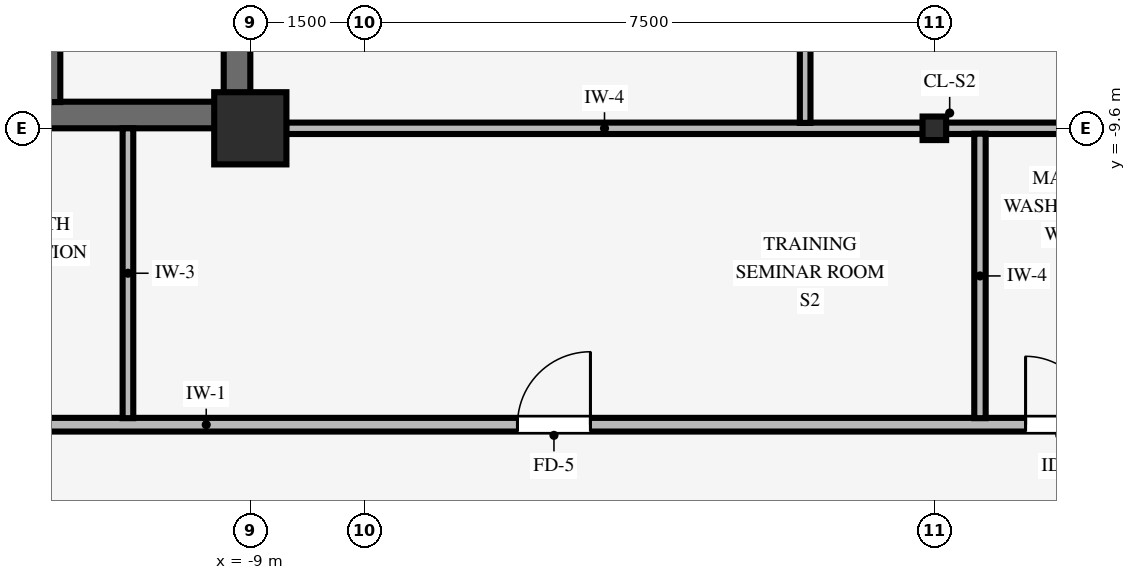
"""IFC4 building model, lengths in metres.
Left out: names, types, materials, properties, quantities, classifications, styles, units other than length and angle.
Written with IfcOpenShell. Run it as: python <this file> out.ifc"""

import sys

from ifc_helpers import new_model, si_unit, direction, frame, frame_2d, origin, origin_2d, place, context, subcontext, project, spatial, rectangle, i_section, extrude, source, transform, mapped, element, fill, save


model = new_model("IFC4")
c1 = context("Model", 3, precision=1e-05, world=origin(), true_north=direction((0.0, 1.0)))
c2 = subcontext(c1, "Body", "Model", "MODEL_VIEW")
j1 = project(units=[si_unit("LENGTHUNIT", "METRE"), si_unit("PLANEANGLEUNIT", "RADIAN")], contexts=[c1])
p1 = place(None, origin())
s1 = spatial("IfcSite", under=j1, at=p1, CompositionType="ELEMENT")
p2 = place(p1, origin())
s2 = spatial("IfcBuilding", under=s1, at=p2, CompositionType="ELEMENT")
p3 = place(p2, frame((0.0, 0.0, 212.8)))
s3 = spatial("IfcBuildingStorey", under=s2, at=p3, CompositionType="ELEMENT", Elevation=212.8)
p4 = place(p3, frame((-17.5, -9.425, 0.0), z_axis=(0.0, 0.0, 1.0), x_axis=(1.0, 0.0, 0.0)))
e1 = element("IfcWall", 1, at=p4, inside=s3, PredefinedType="SHEAR", context=c2, shape_type="SweptSolid", body=[
    extrude(rectangle(XDim=8.5, YDim=0.35, at=frame_2d((4.25, 0.0))), origin(), (0.0, 0.0, 1.0), 3.37),
])
p5 = place(p3, frame((-9.175, -9.255, 0.0), z_axis=(0.0, 0.0, 1.0), x_axis=(0.0, 1.0, 0.0)))
e2 = element("IfcWall", 2, at=p5, inside=s3, PredefinedType="SHEAR", context=c2, shape_type="SweptSolid", body=[
    extrude(rectangle(XDim=18.51, YDim=0.35, at=frame_2d((9.255, 0.0))), origin(), (0.0, 0.0, 1.0), 3.37),
])
p6 = place(p5, frame((8.655, 0.0, 0.0)))
e3 = element("IfcOpeningElement", 3, at=p6, cuts=e2, PredefinedType="OPENING", context=c2, shape_type="SweptSolid", body=[
    extrude(rectangle(XDim=1.2, YDim=2.15, at=frame_2d((0.6, 1.075))), frame((0.0, 0.185, 0.0), z_axis=(0.0, -1.0, 0.0), x_axis=(1.0, 0.0, 0.0)), (0.0, 0.0, 1.0), 0.37),
])
p7 = place(p3, frame((-9.0, -9.6, 0.0), z_axis=(0.0, 0.0, 1.0), x_axis=(1.0, 0.0, 0.0)))
e4 = element("IfcColumn", 4, at=p7, inside=s3, PredefinedType="COLUMN", context=c2, shape_type="SweptSolid", body=[
    extrude(rectangle(XDim=0.95, YDim=0.95, at=origin_2d()), origin(), (0.0, 0.0, 1.0), 3.37),
])
p8 = place(p3, frame((0.0, -9.6, 0.0), z_axis=(0.0, 0.0, 1.0), x_axis=(1.0, 0.0, 0.0)))
e5 = element("IfcColumn", 5, at=p8, inside=s3, PredefinedType="COLUMN", context=c2, shape_type="SweptSolid", body=[
    extrude(i_section(OverallWidth=0.31, OverallDepth=0.31, WebThickness=0.015, FlangeThickness=0.015, FilletRadius=0.015, at=origin_2d()), origin(), (0.0, 0.0, 1.0), 3.37),
])
p9 = place(p3, frame((-11.6, -9.255, 0.0), z_axis=(0.0, 0.0, 1.0), x_axis=(0.0, 1.0, 0.0)))
e6 = element("IfcWall", 6, at=p9, inside=s3, PredefinedType="SHEAR", context=c2, shape_type="SweptSolid", body=[
    extrude(rectangle(XDim=8.025, YDim=0.2, at=frame_2d((4.012, 0.0))), origin(), (0.0, 0.0, 1.0), 3.37),
])
p10 = place(p9, frame((5.615, 0.0, 0.0)))
e7 = element("IfcOpeningElement", 7, at=p10, cuts=e6, PredefinedType="OPENING", context=c2, shape_type="SweptSolid", body=[
    extrude(rectangle(XDim=0.88, YDim=2.1, at=frame_2d((0.44, 1.05))), frame((0.0, 0.11, 0.0), z_axis=(0.0, -1.0, 0.0), x_axis=(1.0, 0.0, 0.0)), (0.0, 0.0, 1.0), 0.22),
])
p11 = place(p3, frame((-17.7, -13.5, 0.0), z_axis=(0.0, 0.0, 1.0), x_axis=(1.0, 0.0, 0.0)))
e8 = element("IfcWall", 8, at=p11, inside=s3, PredefinedType="PARTITIONING", context=c2, shape_type="SweptSolid", body=[
    extrude(rectangle(XDim=24.3, YDim=0.18, at=frame_2d((12.15, 0.0))), origin(), (0.0, 0.0, 1.0), 3.008),
])
p12 = place(p11, frame((12.215, 0.0, 0.0)))
e9 = element("IfcOpeningElement", 9, at=p12, cuts=e8, PredefinedType="OPENING", context=c2, shape_type="SweptSolid", body=[
    extrude(rectangle(XDim=0.96, YDim=2.1, at=frame_2d((0.48, 1.05))), frame((0.0, 0.1, 0.0), z_axis=(0.0, -1.0, 0.0), x_axis=(1.0, 0.0, 0.0)), (0.0, 0.0, 1.0), 0.2),
])
p13 = place(p11, frame((3.065, 0.0, 0.0)))
e10 = element("IfcOpeningElement", 10, at=p13, cuts=e8, PredefinedType="OPENING", context=c2, shape_type="SweptSolid", body=[
    extrude(rectangle(XDim=0.96, YDim=2.1, at=frame_2d((0.48, 1.05))), frame((0.0, 0.1, 0.0), z_axis=(0.0, -1.0, 0.0), x_axis=(1.0, 0.0, 0.0)), (0.0, 0.0, 1.0), 0.2),
])
p14 = place(p11, frame((18.9, 0.0, 0.0)))
e11 = element("IfcOpeningElement", 11, at=p14, cuts=e8, PredefinedType="OPENING", context=c2, shape_type="SweptSolid", body=[
    extrude(rectangle(XDim=0.9, YDim=2.1, at=frame_2d((0.45, 1.05))), frame((0.0, 0.1, 0.0), z_axis=(0.0, -1.0, 0.0), x_axis=(1.0, 0.0, 0.0)), (0.0, 0.0, 1.0), 0.2),
])
p15 = place(p11, frame((21.0, 0.0, 0.0)))
e12 = element("IfcOpeningElement", 12, at=p15, cuts=e8, PredefinedType="OPENING", context=c2, shape_type="SweptSolid", body=[
    extrude(rectangle(XDim=0.9, YDim=2.1, at=frame_2d((0.45, 1.05))), frame((0.0, 0.1, 0.0), z_axis=(0.0, -1.0, 0.0), x_axis=(1.0, 0.0, 0.0)), (0.0, 0.0, 1.0), 0.2),
])
p16 = place(p3, frame((-8.529, -9.6, 0.0), z_axis=(0.0, 0.0, 1.0), x_axis=(1.0, 0.0, 0.0)))
e13 = element("IfcWall", 13, at=p16, inside=s3, PredefinedType="PARTITIONING", context=c2, shape_type="SweptSolid", body=[
    extrude(rectangle(XDim=8.378, YDim=0.15, at=frame_2d((4.189, 0.0))), origin(), (0.0, 0.0, 1.0), 2.405),
])
p17 = place(p3, frame((0.151, -9.6, 0.0), z_axis=(0.0, 0.0, 1.0), x_axis=(1.0, 0.0, 0.0)))
e14 = element("IfcWall", 14, at=p17, inside=s3, PredefinedType="PARTITIONING", context=c2, shape_type="SweptSolid", body=[
    extrude(rectangle(XDim=6.363, YDim=0.15, at=frame_2d((3.182, 0.0))), origin(), (0.0, 0.0, 1.0), 2.405),
])
p18 = place(p3, frame((-10.61, -13.414, 0.0), z_axis=(0.0, 0.0, 1.0), x_axis=(0.0, 1.0, 0.0)))
e15 = element("IfcWall", 15, at=p18, inside=s3, PredefinedType="PARTITIONING", context=c2, shape_type="SweptSolid", body=[
    extrude(rectangle(XDim=3.814, YDim=0.14, at=frame_2d((1.907, 0.0))), origin(), (0.0, 0.0, 1.0), 3.36),
])
p19 = place(p3, frame((-1.7, -9.529, 0.0), z_axis=(0.0, 0.0, 1.0), x_axis=(0.0, 1.0, 0.0)))
e16 = element("IfcWall", 16, at=p19, inside=s3, PredefinedType="PARTITIONING", context=c2, shape_type="SweptSolid", body=[
    extrude(rectangle(XDim=8.193, YDim=0.14, at=frame_2d((4.097, 0.0))), origin(), (0.0, 0.0, 1.0), 3.36),
])
p20 = place(p3, frame((0.6, -13.414, 0.0), z_axis=(0.0, 0.0, 1.0), x_axis=(0.0, 1.0, 0.0)))
e17 = element("IfcWall", 17, at=p20, inside=s3, PredefinedType="PARTITIONING", context=c2, shape_type="SweptSolid", body=[
    extrude(rectangle(XDim=3.743, YDim=0.15, at=frame_2d((1.872, 0.0))), origin(), (0.0, 0.0, 1.0), 3.36),
])
m1 = source(origin(), c2, "Body", "SweptSolid", [
    extrude(rectangle(XDim=0.96, YDim=2.1, at=frame_2d((0.48, 1.05))), frame((0.0, 0.025, 0.0), z_axis=(0.0, -1.0, 0.0), x_axis=(1.0, 0.0, 0.0)), (0.0, 0.0, 1.0), 0.05),
])
p21 = place(p12, origin())
e18 = element("IfcDoor", 18, at=p21, inside=s3, OperationType="SINGLE_SWING_RIGHT", PredefinedType="DOOR", context=c2, shape_type="MappedRepresentation", body=[
    mapped(m1, transform((0.0, 0.0, 0.0), scale=1.0)),
])
fill(e9, e18)
m2 = source(origin(), c2, "Body", "SweptSolid", [
    extrude(rectangle(XDim=0.9, YDim=2.1, at=frame_2d((0.45, 1.05))), frame((0.0, 0.025, 0.0), z_axis=(0.0, -1.0, 0.0), x_axis=(1.0, 0.0, 0.0)), (0.0, 0.0, 1.0), 0.05),
])
p22 = place(p14, origin())
e19 = element("IfcDoor", 19, at=p22, inside=s3, OperationType="SINGLE_SWING_LEFT", PredefinedType="DOOR", context=c2, shape_type="MappedRepresentation", body=[
    mapped(m2, transform((0.0, 0.0, 0.0), scale=1.0)),
])
fill(e11, e19)
save(model, sys.argv[1])
